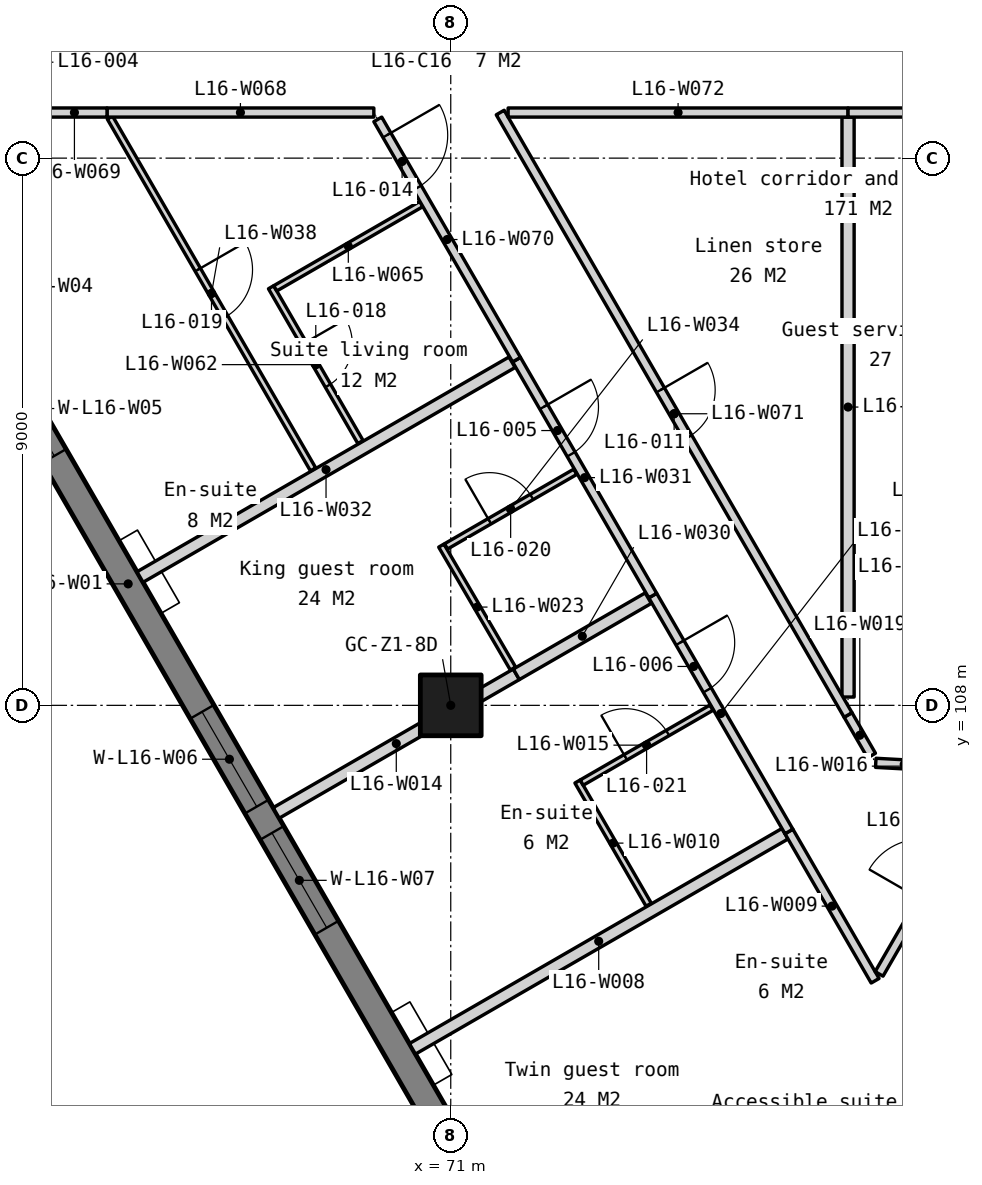
"""IFC4 building model, lengths in metres.
Left out: names, types, materials, properties, quantities, classifications, styles, units other than length and angle.
Written with IfcOpenShell. Run it as: python <this file> out.ifc"""

import sys

from ifc_helpers import new_model, si_unit, direction, frame, frame_2d, origin, origin_2d, place, context, subcontext, project, spatial, polyline, rectangle, outline, extrude, element, fill, save


model = new_model("IFC4")
c1 = context("Model", 3, precision=1e-05, world=origin(), true_north=direction((0.0, 1.0)))
c2 = subcontext(c1, "Body", "Model", "MODEL_VIEW")
j1 = project(units=[si_unit("LENGTHUNIT", "METRE"), si_unit("PLANEANGLEUNIT", "RADIAN")], contexts=[c1])
p1 = place(None, origin())
s1 = spatial("IfcSite", under=j1, at=p1, CompositionType="ELEMENT")
p2 = place(p1, origin())
s2 = spatial("IfcBuilding", under=s1, at=p2, CompositionType="ELEMENT")
p3 = place(p2, frame((0.0, 0.0, 70.0)))
s3 = spatial("IfcBuildingStorey", under=s2, at=p3, CompositionType="ELEMENT", Elevation=70.0)
p4 = place(p3, frame((71.0, 108.0, 0.0), z_axis=(0.0, 0.0, 1.0), x_axis=(1.0, 0.0, 0.0)))
e1 = element("IfcColumn", 1, at=p4, inside=s3, PredefinedType="COLUMN", context=c2, shape_type="SweptSolid", body=[
    extrude(rectangle(XDim=1.0, YDim=1.0, at=origin_2d()), origin(), (0.0, 0.0, 1.0), 3.5),
])
p5 = place(p3, frame((54.495, 129.397, -0.15), z_axis=(0.0, 0.0, 1.0), x_axis=(0.499999201451, -0.866025864826, 0.0)))
e2 = element("IfcWall", 2, at=p5, inside=s3, PredefinedType="SOLIDWALL", context=c2, shape_type="SweptSolid", body=[
    extrude(outline(polyline([(44.8, 0.0), (44.8, 3.5), (0.0, 3.5), (0.0, 0.0), (44.8, 0.0)])), frame((0.0, 0.225, 0.0), z_axis=(0.0, -1.0, 0.0), x_axis=(1.0, 0.0, 0.0)), (0.0, 0.0, 1.0), 0.45),
])
p6 = place(p5, frame((0.786, 0.0, 1.05)))
e3 = element("IfcOpeningElement", 3, at=p6, cuts=e2, PredefinedType="OPENING", context=c2, shape_type="SweptSolid", body=[
    extrude(rectangle(XDim=1.2, YDim=1.5, at=frame_2d((0.6, 0.75))), frame((0.0, 0.235, 0.0), z_axis=(0.0, -1.0, 0.0), x_axis=(1.0, 0.0, 0.0)), (0.0, 0.0, 1.0), 0.47),
])
p7 = place(p5, frame((6.91, 0.0, 1.05)))
e4 = element("IfcOpeningElement", 4, at=p7, cuts=e2, PredefinedType="OPENING", context=c2, shape_type="SweptSolid", body=[
    extrude(rectangle(XDim=1.8, YDim=1.5, at=frame_2d((0.9, 0.75))), frame((0.0, 0.235, 0.0), z_axis=(0.0, -1.0, 0.0), x_axis=(1.0, 0.0, 0.0)), (0.0, 0.0, 1.0), 0.47),
])
p8 = place(p5, frame((9.21, 0.0, 1.05)))
e5 = element("IfcOpeningElement", 5, at=p8, cuts=e2, PredefinedType="OPENING", context=c2, shape_type="SweptSolid", body=[
    extrude(rectangle(XDim=1.8, YDim=1.5, at=frame_2d((0.9, 0.75))), frame((0.0, 0.235, 0.0), z_axis=(0.0, -1.0, 0.0), x_axis=(1.0, 0.0, 0.0)), (0.0, 0.0, 1.0), 0.47),
])
p9 = place(p5, frame((15.87, 0.0, 1.05)))
e6 = element("IfcOpeningElement", 6, at=p9, cuts=e2, PredefinedType="OPENING", context=c2, shape_type="SweptSolid", body=[
    extrude(rectangle(XDim=1.8, YDim=1.5, at=frame_2d((0.9, 0.75))), frame((0.0, 0.235, 0.0), z_axis=(0.0, -1.0, 0.0), x_axis=(1.0, 0.0, 0.0)), (0.0, 0.0, 1.0), 0.47),
])
p10 = place(p5, frame((18.17, 0.0, 1.05)))
e7 = element("IfcOpeningElement", 7, at=p10, cuts=e2, PredefinedType="OPENING", context=c2, shape_type="SweptSolid", body=[
    extrude(rectangle(XDim=1.8, YDim=1.5, at=frame_2d((0.9, 0.75))), frame((0.0, 0.235, 0.0), z_axis=(0.0, -1.0, 0.0), x_axis=(1.0, 0.0, 0.0)), (0.0, 0.0, 1.0), 0.47),
])
p11 = place(p5, frame((24.83, 0.0, 1.05)))
e8 = element("IfcOpeningElement", 8, at=p11, cuts=e2, PredefinedType="OPENING", context=c2, shape_type="SweptSolid", body=[
    extrude(rectangle(XDim=1.8, YDim=1.5, at=frame_2d((0.9, 0.75))), frame((0.0, 0.235, 0.0), z_axis=(0.0, -1.0, 0.0), x_axis=(1.0, 0.0, 0.0)), (0.0, 0.0, 1.0), 0.47),
])
p12 = place(p5, frame((27.13, 0.0, 1.05)))
e9 = element("IfcOpeningElement", 9, at=p12, cuts=e2, PredefinedType="OPENING", context=c2, shape_type="SweptSolid", body=[
    extrude(rectangle(XDim=1.8, YDim=1.5, at=frame_2d((0.9, 0.75))), frame((0.0, 0.235, 0.0), z_axis=(0.0, -1.0, 0.0), x_axis=(1.0, 0.0, 0.0)), (0.0, 0.0, 1.0), 0.47),
])
p13 = place(p5, frame((33.79, 0.0, 1.05)))
e10 = element("IfcOpeningElement", 10, at=p13, cuts=e2, PredefinedType="OPENING", context=c2, shape_type="SweptSolid", body=[
    extrude(rectangle(XDim=1.8, YDim=1.5, at=frame_2d((0.9, 0.75))), frame((0.0, 0.235, 0.0), z_axis=(0.0, -1.0, 0.0), x_axis=(1.0, 0.0, 0.0)), (0.0, 0.0, 1.0), 0.47),
])
p14 = place(p5, frame((36.09, 0.0, 1.05)))
e11 = element("IfcOpeningElement", 11, at=p14, cuts=e2, PredefinedType="OPENING", context=c2, shape_type="SweptSolid", body=[
    extrude(rectangle(XDim=1.8, YDim=1.5, at=frame_2d((0.9, 0.75))), frame((0.0, 0.235, 0.0), z_axis=(0.0, -1.0, 0.0), x_axis=(1.0, 0.0, 0.0)), (0.0, 0.0, 1.0), 0.47),
])
p15 = place(p5, frame((42.814, 0.0, 1.05)))
e12 = element("IfcOpeningElement", 12, at=p15, cuts=e2, PredefinedType="OPENING", context=c2, shape_type="SweptSolid", body=[
    extrude(rectangle(XDim=1.2, YDim=1.5, at=frame_2d((0.6, 0.75))), frame((0.0, 0.235, 0.0), z_axis=(0.0, -1.0, 0.0), x_axis=(1.0, 0.0, 0.0)), (0.0, 0.0, 1.0), 0.47),
])
p16 = place(p3, frame((70.37, 102.351, 0.0), z_axis=(0.0, 0.0, 1.0), x_axis=(0.866021813296, 0.500006218857, 0.0)))
e13 = element("IfcWall", 13, at=p16, inside=s3, PredefinedType="PARTITIONING", context=c2, shape_type="SweptSolid", body=[
    extrude(rectangle(XDim=7.075, YDim=0.2, at=frame_2d((3.538, 0.0))), origin(), (0.0, 0.0, 1.0), 3.35),
])
p17 = place(p3, frame((76.562, 105.926, 0.0), z_axis=(0.0, 0.0, 1.0), x_axis=(0.499973412913, -0.866040753302, 0.0)))
e14 = element("IfcWall", 14, at=p17, inside=s3, PredefinedType="PARTITIONING", context=c2, shape_type="SweptSolid", body=[
    extrude(rectangle(XDim=2.835, YDim=0.15, at=frame_2d((1.417, 0.0))), origin(), (0.0, 0.0, 1.0), 3.35),
])
p18 = place(p3, frame((73.085, 106.748, 0.0), z_axis=(0.0, 0.0, 1.0), x_axis=(0.499954256575, -0.866051812152, 0.0)))
e15 = element("IfcWall", 15, at=p18, inside=s3, PredefinedType="PARTITIONING", context=c2, shape_type="SweptSolid", body=[
    extrude(rectangle(XDim=2.34, YDim=0.1, at=frame_2d((1.17, 0.0))), origin(), (0.0, 0.0, 1.0), 3.35),
])
p19 = place(p3, frame((74.322, 109.805, 0.0), z_axis=(0.0, 0.0, 1.0), x_axis=(0.500013360201, -0.866017690131, 0.0)))
e16 = element("IfcWall", 16, at=p19, inside=s3, PredefinedType="PARTITIONING", context=c2, shape_type="SweptSolid", body=[
    extrude(rectangle(XDim=4.48, YDim=0.15, at=frame_2d((2.24, 0.0))), origin(), (0.0, 0.0, 1.0), 3.35),
])
p20 = place(p19, frame((0.896, 0.0, 0.0)))
e17 = element("IfcOpeningElement", 17, at=p20, cuts=e16, PredefinedType="OPENING", context=c2, shape_type="SweptSolid", body=[
    extrude(rectangle(XDim=0.9, YDim=2.1, at=frame_2d((0.45, 1.05))), frame((0.0, 0.085, 0.0), z_axis=(0.0, -1.0, 0.0), x_axis=(1.0, 0.0, 0.0)), (0.0, 0.0, 1.0), 0.17),
])
p21 = place(p3, frame((68.13, 106.23, 0.0), z_axis=(0.0, 0.0, 1.0), x_axis=(0.866030456496, 0.499991248344, 0.0)))
e18 = element("IfcWall", 18, at=p21, inside=s3, PredefinedType="PARTITIONING", context=c2, shape_type="SweptSolid", body=[
    extrude(rectangle(XDim=4.56, YDim=0.2, at=frame_2d((2.28, 0.0))), origin(), (0.0, 0.0, 1.0), 3.35),
])
p22 = place(p3, frame((73.153, 106.729, 0.0), z_axis=(0.0, 0.0, 1.0), x_axis=(0.866040446274, 0.499973944738, 0.0)))
e19 = element("IfcWall", 19, at=p22, inside=s3, PredefinedType="PARTITIONING", context=c2, shape_type="SweptSolid", body=[
    extrude(rectangle(XDim=2.465, YDim=0.1, at=frame_2d((1.232, 0.0))), origin(), (0.0, 0.0, 1.0), 3.35),
])
p23 = place(p22, frame((0.833, 0.0, 0.0)))
e20 = element("IfcOpeningElement", 20, at=p23, cuts=e19, PredefinedType="OPENING", context=c2, shape_type="SweptSolid", body=[
    extrude(rectangle(XDim=0.8, YDim=2.1, at=frame_2d((0.4, 1.05))), frame((0.0, 0.06, 0.0), z_axis=(0.0, -1.0, 0.0), x_axis=(1.0, 0.0, 0.0)), (0.0, 0.0, 1.0), 0.12),
])
p24 = place(p3, frame((78.044, 103.583, 0.0), z_axis=(0.0, 0.0, 1.0), x_axis=(0.499835090783, 0.866120593233, 0.0)))
e21 = element("IfcWall", 21, at=p24, inside=s3, PredefinedType="PARTITIONING", context=c2, shape_type="SweptSolid", body=[
    extrude(rectangle(XDim=3.815, YDim=0.15, at=frame_2d((1.908, 0.0))), origin(), (0.0, 0.0, 1.0), 3.35),
])
p25 = place(p24, frame((1.408, 0.0, 0.0)))
e22 = element("IfcOpeningElement", 22, at=p25, cuts=e21, PredefinedType="OPENING", context=c2, shape_type="SweptSolid", body=[
    extrude(rectangle(XDim=1.0, YDim=2.1, at=frame_2d((0.5, 1.05))), frame((0.0, 0.085, 0.0), z_axis=(0.0, -1.0, 0.0), x_axis=(1.0, 0.0, 0.0)), (0.0, 0.0, 1.0), 0.17),
])
p26 = place(p3, frame((77.99, 107.055, 0.0), z_axis=(0.0, 0.0, 1.0), x_axis=(0.998544170551, -0.053940147, 0.0)))
e23 = element("IfcWall", 23, at=p26, inside=s3, PredefinedType="PARTITIONING", context=c2, shape_type="SweptSolid", body=[
    extrude(rectangle(XDim=0.937, YDim=0.15, at=frame_2d((0.469, 0.0))), origin(), (0.0, 0.0, 1.0), 3.35),
])
p27 = place(p3, frame((77.534, 107.842, 0.0), z_axis=(0.0, 0.0, 1.0), x_axis=(0.500973854789, -0.865462417912, 0.0)))
e24 = element("IfcWall", 24, at=p27, inside=s3, PredefinedType="PARTITIONING", context=c2, shape_type="SweptSolid", body=[
    extrude(rectangle(XDim=0.771, YDim=0.15, at=frame_2d((0.385, 0.0))), origin(), (0.0, 0.0, 1.0), 3.35),
])
p28 = place(p3, frame((77.534, 108.137, 0.0), z_axis=(0.0, 0.0, 1.0), x_axis=(0.0, 1.0, 0.0)))
e25 = element("IfcWall", 25, at=p28, inside=s3, PredefinedType="PARTITIONING", context=c2, shape_type="SweptSolid", body=[
    extrude(rectangle(XDim=9.538, YDim=0.2, at=frame_2d((4.769, 0.0))), origin(), (0.0, 0.0, 1.0), 3.35),
])
p29 = place(p3, frame((70.845, 110.627, 0.0), z_axis=(0.0, 0.0, 1.0), x_axis=(0.503592070056, -0.863941564561, 0.0)))
e26 = element("IfcWall", 26, at=p29, inside=s3, PredefinedType="PARTITIONING", context=c2, shape_type="SweptSolid", body=[
    extrude(rectangle(XDim=2.34, YDim=0.1, at=frame_2d((1.17, 0.0))), origin(), (0.0, 0.0, 1.0), 3.35),
])
p30 = place(p3, frame((72.079, 108.51, 0.0), z_axis=(0.0, 0.0, 1.0), x_axis=(0.866039519639, 0.499975549825, 0.0)))
e27 = element("IfcWall", 27, at=p30, inside=s3, PredefinedType="PARTITIONING", context=c2, shape_type="SweptSolid", body=[
    extrude(rectangle(XDim=2.505, YDim=0.2, at=frame_2d((1.252, 0.0))), origin(), (0.0, 0.0, 1.0), 3.35),
])
p31 = place(p3, frame((72.082, 113.685, 0.0), z_axis=(0.0, 0.0, 1.0), x_axis=(0.499989762656, -0.866031314237, 0.0)))
e28 = element("IfcWall", 28, at=p31, inside=s3, PredefinedType="PARTITIONING", context=c2, shape_type="SweptSolid", body=[
    extrude(rectangle(XDim=4.48, YDim=0.15, at=frame_2d((2.24, 0.0))), origin(), (0.0, 0.0, 1.0), 3.35),
])
p32 = place(p31, frame((0.896, 0.0, 0.0)))
e29 = element("IfcOpeningElement", 29, at=p32, cuts=e28, PredefinedType="OPENING", context=c2, shape_type="SweptSolid", body=[
    extrude(rectangle(XDim=0.9, YDim=2.1, at=frame_2d((0.45, 1.05))), frame((0.0, 0.085, 0.0), z_axis=(0.0, -1.0, 0.0), x_axis=(1.0, 0.0, 0.0)), (0.0, 0.0, 1.0), 0.17),
])
p33 = place(p3, frame((65.89, 110.11, 0.0), z_axis=(0.0, 0.0, 1.0), x_axis=(0.866033669941, 0.499985682323, 0.0)))
e30 = element("IfcWall", 30, at=p33, inside=s3, PredefinedType="PARTITIONING", context=c2, shape_type="SweptSolid", body=[
    extrude(rectangle(XDim=7.065, YDim=0.2, at=frame_2d((3.533, 0.0))), origin(), (0.0, 0.0, 1.0), 3.35),
])
p34 = place(p3, frame((70.922, 110.614, 0.0), z_axis=(0.0, 0.0, 1.0), x_axis=(0.866049783786, 0.499957770222, 0.0)))
e31 = element("IfcWall", 31, at=p34, inside=s3, PredefinedType="PARTITIONING", context=c2, shape_type="SweptSolid", body=[
    extrude(rectangle(XDim=2.455, YDim=0.1, at=frame_2d((1.228, 0.0))), origin(), (0.0, 0.0, 1.0), 3.35),
])
p35 = place(p34, frame((0.827, 0.0, 0.0)))
e32 = element("IfcOpeningElement", 32, at=p35, cuts=e31, PredefinedType="OPENING", context=c2, shape_type="SweptSolid", body=[
    extrude(rectangle(XDim=0.8, YDim=2.1, at=frame_2d((0.4, 1.05))), frame((0.0, 0.06, 0.0), z_axis=(0.0, -1.0, 0.0), x_axis=(1.0, 0.0, 0.0)), (0.0, 0.0, 1.0), 0.12),
])
p36 = place(p3, frame((65.395, 117.668, 0.0), z_axis=(0.0, 0.0, 1.0), x_axis=(0.499986003774, -0.866033484359, 0.0)))
e33 = element("IfcWall", 33, at=p36, inside=s3, PredefinedType="PARTITIONING", context=c2, shape_type="SweptSolid", body=[
    extrude(rectangle(XDim=6.682, YDim=0.1, at=frame_2d((3.341, 0.0))), origin(), (0.0, 0.0, 1.0), 3.35),
])
p37 = place(p36, frame((2.891, 0.0, 0.0)))
e34 = element("IfcOpeningElement", 34, at=p37, cuts=e33, PredefinedType="OPENING", context=c2, shape_type="SweptSolid", body=[
    extrude(rectangle(XDim=0.9, YDim=2.1, at=frame_2d((0.45, 1.05))), frame((0.0, 0.06, 0.0), z_axis=(0.0, -1.0, 0.0), x_axis=(1.0, 0.0, 0.0)), (0.0, 0.0, 1.0), 0.12),
])
p38 = place(p3, frame((68.045, 114.877, 0.0), z_axis=(0.0, 0.0, 1.0), x_axis=(0.499988418424, -0.866032090307, 0.0)))
e35 = element("IfcWall", 35, at=p38, inside=s3, PredefinedType="PARTITIONING", context=c2, shape_type="SweptSolid", body=[
    extrude(rectangle(XDim=2.94, YDim=0.1, at=frame_2d((1.47, 0.0))), origin(), (0.0, 0.0, 1.0), 3.35),
])
p39 = place(p38, frame((1.07, 0.0, 0.0)))
e36 = element("IfcOpeningElement", 36, at=p39, cuts=e35, PredefinedType="OPENING", context=c2, shape_type="SweptSolid", body=[
    extrude(rectangle(XDim=0.8, YDim=2.1, at=frame_2d((0.4, 1.05))), frame((0.0, 0.06, 0.0), z_axis=(0.0, -1.0, 0.0), x_axis=(1.0, 0.0, 0.0)), (0.0, 0.0, 1.0), 0.12),
])
p40 = place(p3, frame((68.114, 114.858, 0.0), z_axis=(0.0, 0.0, 1.0), x_axis=(0.866042014628, 0.499971228071, 0.0)))
e37 = element("IfcWall", 37, at=p40, inside=s3, PredefinedType="PARTITIONING", context=c2, shape_type="SweptSolid", body=[
    extrude(rectangle(XDim=2.775, YDim=0.1, at=frame_2d((1.388, 0.0))), origin(), (0.0, 0.0, 1.0), 3.35),
])
p41 = place(p3, frame((65.347, 117.75, 0.0), z_axis=(0.0, 0.0, 1.0), x_axis=(1.0, 0.0, 0.0)))
e38 = element("IfcWall", 38, at=p41, inside=s3, PredefinedType="PARTITIONING", context=c2, shape_type="SweptSolid", body=[
    extrude(rectangle(XDim=4.388, YDim=0.15, at=frame_2d((2.194, 0.0))), origin(), (0.0, 0.0, 1.0), 3.35),
])
p42 = place(p3, frame((64.275, 117.75, 0.0), z_axis=(0.0, 0.0, 1.0), x_axis=(1.0, 0.0, 0.0)))
e39 = element("IfcWall", 39, at=p42, inside=s3, PredefinedType="PARTITIONING", context=c2, shape_type="SweptSolid", body=[
    extrude(rectangle(XDim=1.072, YDim=0.15, at=frame_2d((0.536, 0.0))), origin(), (0.0, 0.0, 1.0), 3.35),
])
p43 = place(p3, frame((69.8, 117.637, 0.0), z_axis=(0.0, 0.0, 1.0), x_axis=(0.499994135611, -0.866028789565, 0.0)))
e40 = element("IfcWall", 40, at=p43, inside=s3, PredefinedType="PARTITIONING", context=c2, shape_type="SweptSolid", body=[
    extrude(rectangle(XDim=4.563, YDim=0.15, at=frame_2d((2.282, 0.0))), origin(), (0.0, 0.0, 1.0), 3.35),
])
p44 = place(p43, frame((0.3, 0.0, 0.0)))
e41 = element("IfcOpeningElement", 41, at=p44, cuts=e40, PredefinedType="OPENING", context=c2, shape_type="SweptSolid", body=[
    extrude(rectangle(XDim=1.0, YDim=2.1, at=frame_2d((0.5, 1.05))), frame((0.0, 0.085, 0.0), z_axis=(0.0, -1.0, 0.0), x_axis=(1.0, 0.0, 0.0)), (0.0, 0.0, 1.0), 0.17),
])
p45 = place(p3, frame((71.813, 117.75, 0.0), z_axis=(0.0, 0.0, 1.0), x_axis=(0.499997066004, -0.866027097721, 0.0)))
e42 = element("IfcWall", 42, at=p45, inside=s3, PredefinedType="PARTITIONING", context=c2, shape_type="SweptSolid", body=[
    extrude(rectangle(XDim=11.441, YDim=0.15, at=frame_2d((5.72, 0.0))), origin(), (0.0, 0.0, 1.0), 3.35),
])
p46 = place(p45, frame((5.271, 0.0, 0.0)))
e43 = element("IfcOpeningElement", 43, at=p46, cuts=e42, PredefinedType="OPENING", context=c2, shape_type="SweptSolid", body=[
    extrude(rectangle(XDim=0.9, YDim=2.1, at=frame_2d((0.45, 1.05))), frame((0.0, 0.085, 0.0), z_axis=(0.0, -1.0, 0.0), x_axis=(1.0, 0.0, 0.0)), (0.0, 0.0, 1.0), 0.17),
])
p47 = place(p3, frame((71.943, 117.75, 0.0), z_axis=(0.0, 0.0, 1.0), x_axis=(1.0, 0.0, 0.0)))
e44 = element("IfcWall", 44, at=p47, inside=s3, PredefinedType="PARTITIONING", context=c2, shape_type="SweptSolid", body=[
    extrude(rectangle(XDim=5.591, YDim=0.15, at=frame_2d((2.795, 0.0))), origin(), (0.0, 0.0, 1.0), 3.35),
])
p48 = place(p3, frame((77.534, 117.75, 0.0), z_axis=(0.0, 0.0, 1.0), x_axis=(1.0, 0.0, 0.0)))
e45 = element("IfcWall", 45, at=p48, inside=s3, PredefinedType="PARTITIONING", context=c2, shape_type="SweptSolid", body=[
    extrude(rectangle(XDim=3.356, YDim=0.15, at=frame_2d((1.678, 0.0))), origin(), (0.0, 0.0, 1.0), 3.35),
])
p49 = place(p10, origin())
e46 = element("IfcWindow", 46, at=p49, inside=s3, PartitioningType="SINGLE_PANEL", PredefinedType="WINDOW", context=c2, shape_type="SweptSolid", body=[
    extrude(rectangle(XDim=1.8, YDim=1.5, at=frame_2d((0.9, 0.75))), frame((0.0, 0.03, 0.0), z_axis=(0.0, -1.0, 0.0), x_axis=(1.0, 0.0, 0.0)), (0.0, 0.0, 1.0), 0.06),
])
fill(e7, e46)
p50 = place(p11, origin())
e47 = element("IfcWindow", 47, at=p50, inside=s3, PartitioningType="SINGLE_PANEL", PredefinedType="WINDOW", context=c2, shape_type="SweptSolid", body=[
    extrude(rectangle(XDim=1.8, YDim=1.5, at=frame_2d((0.9, 0.75))), frame((0.0, 0.03, 0.0), z_axis=(0.0, -1.0, 0.0), x_axis=(1.0, 0.0, 0.0)), (0.0, 0.0, 1.0), 0.06),
])
fill(e8, e47)
p51 = place(p12, origin())
e48 = element("IfcWindow", 48, at=p51, inside=s3, PartitioningType="SINGLE_PANEL", PredefinedType="WINDOW", context=c2, shape_type="SweptSolid", body=[
    extrude(rectangle(XDim=1.8, YDim=1.5, at=frame_2d((0.9, 0.75))), frame((0.0, 0.03, 0.0), z_axis=(0.0, -1.0, 0.0), x_axis=(1.0, 0.0, 0.0)), (0.0, 0.0, 1.0), 0.06),
])
fill(e9, e48)
p52 = place(p32, origin())
e49 = element("IfcDoor", 49, at=p52, inside=s3, OperationType="SINGLE_SWING_LEFT", PredefinedType="DOOR", context=c2, shape_type="SweptSolid", body=[
    extrude(rectangle(XDim=0.9, YDim=2.1, at=frame_2d((0.45, 1.05))), frame((0.0, 0.025, 0.0), z_axis=(0.0, -1.0, 0.0), x_axis=(1.0, 0.0, 0.0)), (0.0, 0.0, 1.0), 0.05),
])
fill(e29, e49)
p53 = place(p20, origin())
e50 = element("IfcDoor", 50, at=p53, inside=s3, OperationType="SINGLE_SWING_LEFT", PredefinedType="DOOR", context=c2, shape_type="SweptSolid", body=[
    extrude(rectangle(XDim=0.9, YDim=2.1, at=frame_2d((0.45, 1.05))), frame((0.0, 0.025, 0.0), z_axis=(0.0, -1.0, 0.0), x_axis=(1.0, 0.0, 0.0)), (0.0, 0.0, 1.0), 0.05),
])
fill(e17, e50)
p54 = place(p46, origin())
e51 = element("IfcDoor", 51, at=p54, inside=s3, OperationType="SINGLE_SWING_LEFT", PredefinedType="DOOR", context=c2, shape_type="SweptSolid", body=[
    extrude(rectangle(XDim=0.9, YDim=2.1, at=frame_2d((0.45, 1.05))), frame((0.0, 0.025, 0.0), z_axis=(0.0, -1.0, 0.0), x_axis=(1.0, 0.0, 0.0)), (0.0, 0.0, 1.0), 0.05),
])
fill(e43, e51)
p55 = place(p44, origin())
e52 = element("IfcDoor", 52, at=p55, inside=s3, OperationType="SINGLE_SWING_LEFT", PredefinedType="DOOR", context=c2, shape_type="SweptSolid", body=[
    extrude(rectangle(XDim=1.0, YDim=2.1, at=frame_2d((0.5, 1.05))), frame((0.0, 0.025, 0.0), z_axis=(0.0, -1.0, 0.0), x_axis=(1.0, 0.0, 0.0)), (0.0, 0.0, 1.0), 0.05),
])
fill(e41, e52)
p56 = place(p39, origin())
e53 = element("IfcDoor", 53, at=p56, inside=s3, OperationType="SINGLE_SWING_LEFT", PredefinedType="DOOR", context=c2, shape_type="SweptSolid", body=[
    extrude(rectangle(XDim=0.8, YDim=2.1, at=frame_2d((0.4, 1.05))), frame((0.0, 0.025, 0.0), z_axis=(0.0, -1.0, 0.0), x_axis=(1.0, 0.0, 0.0)), (0.0, 0.0, 1.0), 0.05),
])
fill(e36, e53)
p57 = place(p37, origin())
e54 = element("IfcDoor", 54, at=p57, inside=s3, OperationType="SINGLE_SWING_LEFT", PredefinedType="DOOR", context=c2, shape_type="SweptSolid", body=[
    extrude(rectangle(XDim=0.9, YDim=2.1, at=frame_2d((0.45, 1.05))), frame((0.0, 0.025, 0.0), z_axis=(0.0, -1.0, 0.0), x_axis=(1.0, 0.0, 0.0)), (0.0, 0.0, 1.0), 0.05),
])
fill(e34, e54)
p58 = place(p35, origin())
e55 = element("IfcDoor", 55, at=p58, inside=s3, OperationType="SINGLE_SWING_LEFT", PredefinedType="DOOR", context=c2, shape_type="SweptSolid", body=[
    extrude(rectangle(XDim=0.8, YDim=2.1, at=frame_2d((0.4, 1.05))), frame((0.0, 0.025, 0.0), z_axis=(0.0, -1.0, 0.0), x_axis=(1.0, 0.0, 0.0)), (0.0, 0.0, 1.0), 0.05),
])
fill(e32, e55)
p59 = place(p23, origin())
e56 = element("IfcDoor", 56, at=p59, inside=s3, OperationType="SINGLE_SWING_LEFT", PredefinedType="DOOR", context=c2, shape_type="SweptSolid", body=[
    extrude(rectangle(XDim=0.8, YDim=2.1, at=frame_2d((0.4, 1.05))), frame((0.0, 0.025, 0.0), z_axis=(0.0, -1.0, 0.0), x_axis=(1.0, 0.0, 0.0)), (0.0, 0.0, 1.0), 0.05),
])
fill(e20, e56)
save(model, sys.argv[1])
